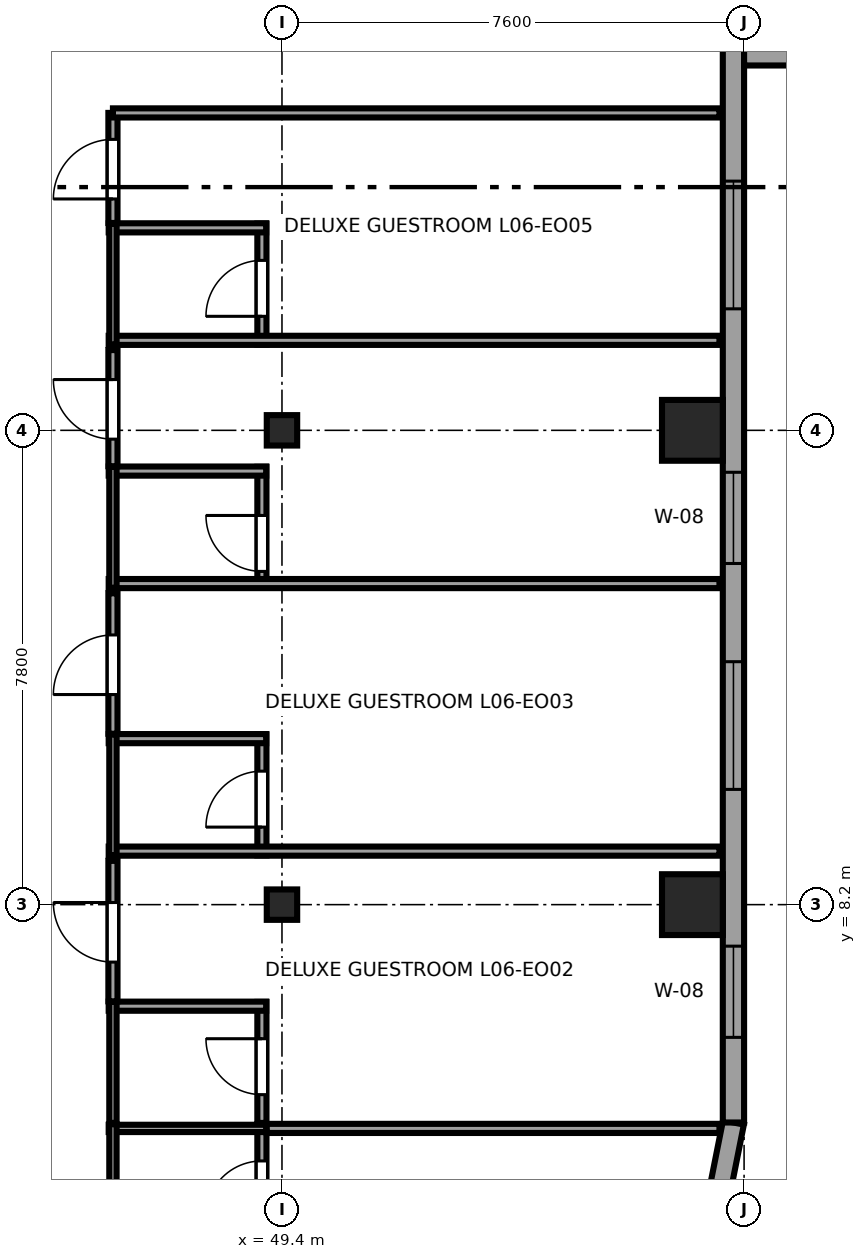
"""IFC4 building model, lengths in metres.
Left out: names, types, materials, properties, quantities, classifications, styles, units other than length and angle.
Written with IfcOpenShell. Run it as: python <this file> out.ifc"""

import sys

from ifc_helpers import new_model, si_unit, direction, frame, frame_2d, origin, origin_2d, place, context, subcontext, project, spatial, rectangle, i_section, extrude, source, transform, mapped, element, fill, save


model = new_model("IFC4")
c1 = context("Model", 3, precision=1e-05, world=origin(), true_north=direction((0.0, 1.0)))
c2 = subcontext(c1, "Body", "Model", "MODEL_VIEW")
j1 = project(units=[si_unit("LENGTHUNIT", "METRE"), si_unit("PLANEANGLEUNIT", "RADIAN")], contexts=[c1])
p1 = place(None, origin())
s1 = spatial("IfcSite", under=j1, at=p1, CompositionType="ELEMENT")
p2 = place(p1, origin())
s2 = spatial("IfcBuilding", under=s1, at=p2, CompositionType="ELEMENT")
p3 = place(p2, frame((0.0, 0.0, 32.0)))
s3 = spatial("IfcBuildingStorey", under=s2, at=p3, CompositionType="ELEMENT", Elevation=32.0)
m1 = source(origin(), c2, "Body", "SweptSolid", [
    extrude(i_section(OverallWidth=0.5, OverallDepth=0.5, WebThickness=0.028, FlangeThickness=0.045, at=origin_2d()), origin(), (0.0, 0.0, 1.0), 3.55),
])
for number, where, z_axis, x_axis in (
    (1, (49.4, 8.2, 0.0), (0.0, 0.0, 1.0), (1.0, 0.0, 0.0)),
    (2, (49.4, 16.0, 0.0), (0.0, 0.0, 1.0), (1.0, 0.0, 0.0)),
):
    element("IfcColumn", number, at=place(p3, frame(where, z_axis=z_axis, x_axis=x_axis)), inside=s3, PredefinedType="COLUMN", context=c2, shape_type="MappedRepresentation", body=[
        mapped(m1, transform((0.0, 0.0, 0.0), x_axis=(1.0, 0.0, 0.0), y_axis=(0.0, 1.0, 0.0), z_axis=(0.0, 0.0, 1.0), scale=1.0)),
    ])
m2 = source(origin(), c2, "Body", "SweptSolid", [
    extrude(rectangle(XDim=1.0, YDim=1.0, at=origin_2d()), origin(), (0.0, 0.0, 1.0), 3.55),
])
for number, where, z_axis, x_axis in (
    (3, (56.15, 8.2, 0.0), (0.0, 0.0, 1.0), (1.0, 0.0, 0.0)),
    (4, (56.15, 16.0, 0.0), (0.0, 0.0, 1.0), (1.0, 0.0, 0.0)),
):
    element("IfcColumn", number, at=place(p3, frame(where, z_axis=z_axis, x_axis=x_axis)), inside=s3, PredefinedType="COLUMN", context=c2, shape_type="MappedRepresentation", body=[
        mapped(m2, transform((0.0, 0.0, 0.0), x_axis=(1.0, 0.0, 0.0), y_axis=(0.0, 1.0, 0.0), z_axis=(0.0, 0.0, 1.0), scale=1.0)),
    ])
p4 = place(p3, frame((56.485, 2.908, 0.0), z_axis=(0.0, 0.0, 1.0), x_axis=(0.195011420161, 0.980800971659, 0.0)))
e5 = element("IfcWall", 5, at=p4, inside=s3, PredefinedType="SOLIDWALL", context=c2, shape_type="SweptSolid", body=[
    extrude(rectangle(XDim=1.743, YDim=0.35, at=frame_2d((0.871, 0.0))), origin(), (0.0, 0.0, 1.0), 3.37),
])
p5 = place(p3, frame((56.825, 4.617, 0.0), z_axis=(0.0, 0.0, 1.0), x_axis=(0.0, 1.0, 0.0)))
e6 = element("IfcWall", 6, at=p5, inside=s3, PredefinedType="SOLIDWALL", context=c2, shape_type="SweptSolid", body=[
    extrude(rectangle(XDim=36.766, YDim=0.35, at=frame_2d((18.383, 0.0))), origin(), (0.0, 0.0, 1.0), 3.37),
])
p6 = place(p5, frame((5.478, 0.0, 0.68)))
e7 = element("IfcOpeningElement", 7, at=p6, cuts=e6, PredefinedType="OPENING", context=c2, shape_type="SweptSolid", body=[
    extrude(rectangle(XDim=2.1, YDim=1.9, at=frame_2d((1.05, 0.95))), frame((0.0, 0.185, 0.0), z_axis=(0.0, -1.0, 0.0), x_axis=(1.0, 0.0, 0.0)), (0.0, 0.0, 1.0), 0.37),
])
p7 = place(p5, frame((13.381, 0.0, 0.68)))
e8 = element("IfcOpeningElement", 8, at=p7, cuts=e6, PredefinedType="OPENING", context=c2, shape_type="SweptSolid", body=[
    extrude(rectangle(XDim=2.1, YDim=1.9, at=frame_2d((1.05, 0.95))), frame((0.0, 0.185, 0.0), z_axis=(0.0, -1.0, 0.0), x_axis=(1.0, 0.0, 0.0)), (0.0, 0.0, 1.0), 0.37),
])
p8 = place(p5, frame((25.786, 0.0, 0.68)))
e9 = element("IfcOpeningElement", 9, at=p8, cuts=e6, PredefinedType="OPENING", context=c2, shape_type="SweptSolid", body=[
    extrude(rectangle(XDim=2.1, YDim=1.9, at=frame_2d((1.05, 0.95))), frame((0.0, 0.185, 0.0), z_axis=(0.0, -1.0, 0.0), x_axis=(1.0, 0.0, 0.0)), (0.0, 0.0, 1.0), 0.37),
])
p9 = place(p5, frame((30.238, 0.0, 0.68)))
e10 = element("IfcOpeningElement", 10, at=p9, cuts=e6, PredefinedType="OPENING", context=c2, shape_type="SweptSolid", body=[
    extrude(rectangle(XDim=2.1, YDim=1.9, at=frame_2d((1.05, 0.95))), frame((0.0, 0.185, 0.0), z_axis=(0.0, -1.0, 0.0), x_axis=(1.0, 0.0, 0.0)), (0.0, 0.0, 1.0), 0.37),
])
p10 = place(p5, frame((33.14, 0.0, 0.68)))
e11 = element("IfcOpeningElement", 11, at=p10, cuts=e6, PredefinedType="OPENING", context=c2, shape_type="SweptSolid", body=[
    extrude(rectangle(XDim=2.1, YDim=1.9, at=frame_2d((1.05, 0.95))), frame((0.0, 0.185, 0.0), z_axis=(0.0, -1.0, 0.0), x_axis=(1.0, 0.0, 0.0)), (0.0, 0.0, 1.0), 0.37),
])
p11 = place(p5, frame((1.4, 0.0, 0.62)))
e12 = element("IfcOpeningElement", 12, at=p11, cuts=e6, PredefinedType="OPENING", context=c2, shape_type="SweptSolid", body=[
    extrude(rectangle(XDim=1.5, YDim=1.55, at=frame_2d((0.75, 0.775))), frame((0.0, 0.185, 0.0), z_axis=(0.0, -1.0, 0.0), x_axis=(1.0, 0.0, 0.0)), (0.0, 0.0, 1.0), 0.37),
])
p12 = place(p5, frame((9.193, 0.0, 0.62)))
e13 = element("IfcOpeningElement", 13, at=p12, cuts=e6, PredefinedType="OPENING", context=c2, shape_type="SweptSolid", body=[
    extrude(rectangle(XDim=1.5, YDim=1.55, at=frame_2d((0.75, 0.775))), frame((0.0, 0.185, 0.0), z_axis=(0.0, -1.0, 0.0), x_axis=(1.0, 0.0, 0.0)), (0.0, 0.0, 1.0), 0.37),
])
p13 = place(p3, frame((57.0, 22.15, 0.0), z_axis=(0.0, 0.0, 1.0), x_axis=(1.0, 0.0, 0.0)))
e14 = element("IfcWall", 14, at=p13, inside=s3, PredefinedType="PARAPET", context=c2, shape_type="SweptSolid", body=[
    extrude(rectangle(XDim=8.25, YDim=0.3, at=frame_2d((4.125, 0.0))), origin(), (0.0, 0.0, 1.0), 1.15),
])
p14 = place(p3, frame((49.07, 2.6, 0.0), z_axis=(0.0, 0.0, 1.0), x_axis=(0.0, 1.0, 0.0)))
e15 = element("IfcWall", 15, at=p14, inside=s3, PredefinedType="PARTITIONING", context=c2, shape_type="SweptSolid", body=[
    extrude(rectangle(XDim=1.99, YDim=0.15, at=frame_2d((0.995, 0.0))), origin(), (0.0, 0.0, 1.0), 3.37),
])
p15 = place(p14, frame((0.465, 0.0, 0.0)))
e16 = element("IfcOpeningElement", 16, at=p15, cuts=e15, PredefinedType="OPENING", context=c2, shape_type="SweptSolid", body=[
    extrude(rectangle(XDim=0.92, YDim=2.01, at=frame_2d((0.46, 1.005))), frame((0.0, 0.085, 0.0), z_axis=(0.0, -1.0, 0.0), x_axis=(1.0, 0.0, 0.0)), (0.0, 0.0, 1.0), 0.17),
])
p16 = place(p3, frame((46.55, 4.52, 0.0), z_axis=(0.0, 0.0, 1.0), x_axis=(1.0, 0.0, 0.0)))
e17 = element("IfcWall", 17, at=p16, inside=s3, PredefinedType="PLUMBINGWALL", context=c2, shape_type="SweptSolid", body=[
    extrude(rectangle(XDim=2.59, YDim=0.12, at=frame_2d((1.295, 0.0))), origin(), (0.0, 0.0, 1.0), 3.37),
])
p17 = place(p3, frame((46.62, 2.6, 0.0), z_axis=(0.0, 0.0, 1.0), x_axis=(0.0, 1.0, 0.0)))
e18 = element("IfcWall", 18, at=p17, inside=s3, PredefinedType="PLUMBINGWALL", context=c2, shape_type="SweptSolid", body=[
    extrude(rectangle(XDim=1.99, YDim=0.12, at=frame_2d((0.995, 0.0))), origin(), (0.0, 0.0, 1.0), 3.37),
])
p18 = place(p3, frame((49.07, 4.61, 0.0), z_axis=(0.0, 0.0, 1.0), x_axis=(0.0, 1.0, 0.0)))
e19 = element("IfcWall", 19, at=p18, inside=s3, PredefinedType="PARTITIONING", context=c2, shape_type="SweptSolid", body=[
    extrude(rectangle(XDim=1.99, YDim=0.15, at=frame_2d((0.995, 0.0))), origin(), (0.0, 0.0, 1.0), 3.37),
])
p19 = place(p18, frame((0.465, 0.0, 0.0)))
e20 = element("IfcOpeningElement", 20, at=p19, cuts=e19, PredefinedType="OPENING", context=c2, shape_type="SweptSolid", body=[
    extrude(rectangle(XDim=0.92, YDim=2.01, at=frame_2d((0.46, 1.005))), frame((0.0, 0.085, 0.0), z_axis=(0.0, -1.0, 0.0), x_axis=(1.0, 0.0, 0.0)), (0.0, 0.0, 1.0), 0.17),
])
p20 = place(p3, frame((46.55, 6.53, 0.0), z_axis=(0.0, 0.0, 1.0), x_axis=(1.0, 0.0, 0.0)))
e21 = element("IfcWall", 21, at=p20, inside=s3, PredefinedType="PARTITIONING", context=c2, shape_type="SweptSolid", body=[
    extrude(rectangle(XDim=2.59, YDim=0.15, at=frame_2d((1.295, 0.0))), origin(), (0.0, 0.0, 1.0), 3.37),
])
p21 = place(p3, frame((46.62, 4.61, 0.0), z_axis=(0.0, 0.0, 1.0), x_axis=(0.0, 1.0, 0.0)))
e22 = element("IfcWall", 22, at=p21, inside=s3, PredefinedType="PLUMBINGWALL", context=c2, shape_type="SweptSolid", body=[
    extrude(rectangle(XDim=1.99, YDim=0.12, at=frame_2d((0.995, 0.0))), origin(), (0.0, 0.0, 1.0), 3.37),
])
p22 = place(p3, frame((49.07, 9.01, 0.0), z_axis=(0.0, 0.0, 1.0), x_axis=(0.0, 1.0, 0.0)))
e23 = element("IfcWall", 23, at=p22, inside=s3, PredefinedType="PARTITIONING", context=c2, shape_type="SweptSolid", body=[
    extrude(rectangle(XDim=1.99, YDim=0.15, at=frame_2d((0.995, 0.0))), origin(), (0.0, 0.0, 1.0), 3.37),
])
p23 = place(p22, frame((0.465, 0.0, 0.0)))
e24 = element("IfcOpeningElement", 24, at=p23, cuts=e23, PredefinedType="OPENING", context=c2, shape_type="SweptSolid", body=[
    extrude(rectangle(XDim=0.92, YDim=2.01, at=frame_2d((0.46, 1.005))), frame((0.0, 0.085, 0.0), z_axis=(0.0, -1.0, 0.0), x_axis=(1.0, 0.0, 0.0)), (0.0, 0.0, 1.0), 0.17),
])
p24 = place(p3, frame((46.55, 9.08, 0.0), z_axis=(0.0, 0.0, 1.0), x_axis=(1.0, 0.0, 0.0)))
e25 = element("IfcWall", 25, at=p24, inside=s3, PredefinedType="PARTITIONING", context=c2, shape_type="SweptSolid", body=[
    extrude(rectangle(XDim=10.045, YDim=0.15, at=frame_2d((5.022, 0.0))), origin(), (0.0, 0.0, 1.0), 3.37),
])
p25 = place(p3, frame((46.55, 10.93, 0.0), z_axis=(0.0, 0.0, 1.0), x_axis=(1.0, 0.0, 0.0)))
e26 = element("IfcWall", 26, at=p25, inside=s3, PredefinedType="PARTITIONING", context=c2, shape_type="SweptSolid", body=[
    extrude(rectangle(XDim=2.59, YDim=0.15, at=frame_2d((1.295, 0.0))), origin(), (0.0, 0.0, 1.0), 3.37),
])
p26 = place(p3, frame((46.62, 9.01, 0.0), z_axis=(0.0, 0.0, 1.0), x_axis=(0.0, 1.0, 0.0)))
e27 = element("IfcWall", 27, at=p26, inside=s3, PredefinedType="PLUMBINGWALL", context=c2, shape_type="SweptSolid", body=[
    extrude(rectangle(XDim=1.99, YDim=0.12, at=frame_2d((0.995, 0.0))), origin(), (0.0, 0.0, 1.0), 3.37),
])
p27 = place(p3, frame((49.07, 13.41, 0.0), z_axis=(0.0, 0.0, 1.0), x_axis=(0.0, 1.0, 0.0)))
e28 = element("IfcWall", 28, at=p27, inside=s3, PredefinedType="PARTITIONING", context=c2, shape_type="SweptSolid", body=[
    extrude(rectangle(XDim=1.99, YDim=0.15, at=frame_2d((0.995, 0.0))), origin(), (0.0, 0.0, 1.0), 3.37),
])
p28 = place(p27, frame((0.27, 0.0, 0.0)))
e29 = element("IfcOpeningElement", 29, at=p28, cuts=e28, PredefinedType="OPENING", context=c2, shape_type="SweptSolid", body=[
    extrude(rectangle(XDim=0.92, YDim=2.01, at=frame_2d((0.46, 1.005))), frame((0.0, 0.085, 0.0), z_axis=(0.0, -1.0, 0.0), x_axis=(1.0, 0.0, 0.0)), (0.0, 0.0, 1.0), 0.17),
])
p29 = place(p3, frame((46.55, 13.48, 0.0), z_axis=(0.0, 0.0, 1.0), x_axis=(1.0, 0.0, 0.0)))
e30 = element("IfcWall", 30, at=p29, inside=s3, PredefinedType="PARTITIONING", context=c2, shape_type="SweptSolid", body=[
    extrude(rectangle(XDim=10.045, YDim=0.15, at=frame_2d((5.022, 0.0))), origin(), (0.0, 0.0, 1.0), 3.37),
])
p30 = place(p3, frame((46.55, 15.33, 0.0), z_axis=(0.0, 0.0, 1.0), x_axis=(1.0, 0.0, 0.0)))
e31 = element("IfcWall", 31, at=p30, inside=s3, PredefinedType="PARTITIONING", context=c2, shape_type="SweptSolid", body=[
    extrude(rectangle(XDim=2.59, YDim=0.15, at=frame_2d((1.295, 0.0))), origin(), (0.0, 0.0, 1.0), 3.37),
])
p31 = place(p3, frame((46.62, 13.41, 0.0), z_axis=(0.0, 0.0, 1.0), x_axis=(0.0, 1.0, 0.0)))
e32 = element("IfcWall", 32, at=p31, inside=s3, PredefinedType="PLUMBINGWALL", context=c2, shape_type="SweptSolid", body=[
    extrude(rectangle(XDim=1.99, YDim=0.12, at=frame_2d((0.995, 0.0))), origin(), (0.0, 0.0, 1.0), 3.37),
])
p32 = place(p3, frame((49.07, 17.41, 0.0), z_axis=(0.0, 0.0, 1.0), x_axis=(0.0, 1.0, 0.0)))
e33 = element("IfcWall", 33, at=p32, inside=s3, PredefinedType="PARTITIONING", context=c2, shape_type="SweptSolid", body=[
    extrude(rectangle(XDim=1.99, YDim=0.15, at=frame_2d((0.995, 0.0))), origin(), (0.0, 0.0, 1.0), 3.37),
])
p33 = place(p32, frame((0.465, 0.0, 0.0)))
e34 = element("IfcOpeningElement", 34, at=p33, cuts=e33, PredefinedType="OPENING", context=c2, shape_type="SweptSolid", body=[
    extrude(rectangle(XDim=0.92, YDim=2.01, at=frame_2d((0.46, 1.005))), frame((0.0, 0.085, 0.0), z_axis=(0.0, -1.0, 0.0), x_axis=(1.0, 0.0, 0.0)), (0.0, 0.0, 1.0), 0.17),
])
p34 = place(p3, frame((46.55, 17.48, 0.0), z_axis=(0.0, 0.0, 1.0), x_axis=(1.0, 0.0, 0.0)))
e35 = element("IfcWall", 35, at=p34, inside=s3, PredefinedType="PARTITIONING", context=c2, shape_type="SweptSolid", body=[
    extrude(rectangle(XDim=10.045, YDim=0.15, at=frame_2d((5.022, 0.0))), origin(), (0.0, 0.0, 1.0), 3.37),
])
p35 = place(p3, frame((46.55, 19.33, 0.0), z_axis=(0.0, 0.0, 1.0), x_axis=(1.0, 0.0, 0.0)))
e36 = element("IfcWall", 36, at=p35, inside=s3, PredefinedType="PARTITIONING", context=c2, shape_type="SweptSolid", body=[
    extrude(rectangle(XDim=2.59, YDim=0.15, at=frame_2d((1.295, 0.0))), origin(), (0.0, 0.0, 1.0), 3.37),
])
p36 = place(p3, frame((46.62, 17.41, 0.0), z_axis=(0.0, 0.0, 1.0), x_axis=(0.0, 1.0, 0.0)))
e37 = element("IfcWall", 37, at=p36, inside=s3, PredefinedType="PLUMBINGWALL", context=c2, shape_type="SweptSolid", body=[
    extrude(rectangle(XDim=1.99, YDim=0.12, at=frame_2d((0.995, 0.0))), origin(), (0.0, 0.0, 1.0), 3.37),
])
p37 = place(p3, frame((49.15, 4.52, 0.0), z_axis=(0.0, 0.0, 1.0), x_axis=(1.0, 0.0, 0.0)))
e38 = element("IfcWall", 38, at=p37, inside=s3, PredefinedType="PARTITIONING", context=c2, shape_type="SweptSolid", body=[
    extrude(rectangle(XDim=7.445, YDim=0.15, at=frame_2d((3.723, 0.0))), origin(), (0.0, 0.0, 1.0), 3.37),
])
p38 = place(p3, frame((46.62, 6.61, 0.0), z_axis=(0.0, 0.0, 1.0), x_axis=(0.0, 1.0, 0.0)))
e39 = element("IfcWall", 39, at=p38, inside=s3, PredefinedType="PARTITIONING", context=c2, shape_type="SweptSolid", body=[
    extrude(rectangle(XDim=2.31, YDim=0.15, at=frame_2d((1.155, 0.0))), origin(), (0.0, 0.0, 1.0), 3.37),
])
p39 = place(p38, frame((0.645, 0.0, 0.0)))
e40 = element("IfcOpeningElement", 40, at=p39, cuts=e39, PredefinedType="OPENING", context=c2, shape_type="SweptSolid", body=[
    extrude(rectangle(XDim=0.98, YDim=2.12, at=frame_2d((0.49, 1.06))), frame((0.0, 0.085, 0.0), z_axis=(0.0, -1.0, 0.0), x_axis=(1.0, 0.0, 0.0)), (0.0, 0.0, 1.0), 0.17),
])
p40 = place(p3, frame((46.62, 11.01, 0.0), z_axis=(0.0, 0.0, 1.0), x_axis=(0.0, 1.0, 0.0)))
e41 = element("IfcWall", 41, at=p40, inside=s3, PredefinedType="PARTITIONING", context=c2, shape_type="SweptSolid", body=[
    extrude(rectangle(XDim=2.31, YDim=0.15, at=frame_2d((1.155, 0.0))), origin(), (0.0, 0.0, 1.0), 3.37),
])
p41 = place(p40, frame((0.645, 0.0, 0.0)))
e42 = element("IfcOpeningElement", 42, at=p41, cuts=e41, PredefinedType="OPENING", context=c2, shape_type="SweptSolid", body=[
    extrude(rectangle(XDim=0.98, YDim=2.12, at=frame_2d((0.49, 1.06))), frame((0.0, 0.085, 0.0), z_axis=(0.0, -1.0, 0.0), x_axis=(1.0, 0.0, 0.0)), (0.0, 0.0, 1.0), 0.17),
])
p42 = place(p3, frame((46.62, 15.41, 0.0), z_axis=(0.0, 0.0, 1.0), x_axis=(0.0, 1.0, 0.0)))
e43 = element("IfcWall", 43, at=p42, inside=s3, PredefinedType="PARTITIONING", context=c2, shape_type="SweptSolid", body=[
    extrude(rectangle(XDim=1.91, YDim=0.15, at=frame_2d((0.955, 0.0))), origin(), (0.0, 0.0, 1.0), 3.37),
])
p43 = place(p42, frame((0.445, 0.0, 0.0)))
e44 = element("IfcOpeningElement", 44, at=p43, cuts=e43, PredefinedType="OPENING", context=c2, shape_type="SweptSolid", body=[
    extrude(rectangle(XDim=0.98, YDim=2.12, at=frame_2d((0.49, 1.06))), frame((0.0, 0.085, 0.0), z_axis=(0.0, -1.0, 0.0), x_axis=(1.0, 0.0, 0.0)), (0.0, 0.0, 1.0), 0.17),
])
p44 = place(p3, frame((46.62, 19.41, 0.0), z_axis=(0.0, 0.0, 1.0), x_axis=(0.0, 1.0, 0.0)))
e45 = element("IfcWall", 45, at=p44, inside=s3, PredefinedType="PARTITIONING", context=c2, shape_type="SweptSolid", body=[
    extrude(rectangle(XDim=1.81, YDim=0.15, at=frame_2d((0.905, 0.0))), origin(), (0.0, 0.0, 1.0), 3.37),
])
p45 = place(p44, frame((0.395, 0.0, 0.0)))
e46 = element("IfcOpeningElement", 46, at=p45, cuts=e45, PredefinedType="OPENING", context=c2, shape_type="SweptSolid", body=[
    extrude(rectangle(XDim=0.98, YDim=2.12, at=frame_2d((0.49, 1.06))), frame((0.0, 0.085, 0.0), z_axis=(0.0, -1.0, 0.0), x_axis=(1.0, 0.0, 0.0)), (0.0, 0.0, 1.0), 0.17),
])
p46 = place(p3, frame((46.62, 21.22, 0.0), z_axis=(0.0, 0.0, 1.0), x_axis=(1.0, 0.0, 0.0)))
e47 = element("IfcWall", 47, at=p46, inside=s3, PredefinedType="PARTITIONING", context=c2, shape_type="SweptSolid", body=[
    extrude(rectangle(XDim=9.975, YDim=0.15, at=frame_2d((4.987, 0.0))), origin(), (0.0, 0.0, 1.0), 3.37),
])
m3 = source(origin(), c2, "Body", "SweptSolid", [
    extrude(rectangle(XDim=2.1, YDim=1.9, at=frame_2d((1.05, 0.95))), frame((0.0, 0.09, 0.0), z_axis=(0.0, -1.0, 0.0), x_axis=(1.0, 0.0, 0.0)), (0.0, 0.0, 1.0), 0.06),
])
p47 = place(p6, origin())
e48 = element("IfcWindow", 48, at=p47, inside=s3, PartitioningType="TRIPLE_PANEL_HORIZONTAL", PredefinedType="WINDOW", context=c2, shape_type="MappedRepresentation", body=[
    mapped(m3, transform((0.0, 0.0, 0.0), x_axis=(1.0, 0.0, 0.0), y_axis=(0.0, 1.0, 0.0), z_axis=(0.0, 0.0, 1.0), scale=1.0)),
])
fill(e7, e48)
p48 = place(p7, origin())
e49 = element("IfcWindow", 49, at=p48, inside=s3, PartitioningType="TRIPLE_PANEL_HORIZONTAL", PredefinedType="WINDOW", context=c2, shape_type="MappedRepresentation", body=[
    mapped(m3, transform((0.0, 0.0, 0.0), x_axis=(1.0, 0.0, 0.0), y_axis=(0.0, 1.0, 0.0), z_axis=(0.0, 0.0, 1.0), scale=1.0)),
])
fill(e8, e49)
m4 = source(origin(), c2, "Body", "SweptSolid", [
    extrude(rectangle(XDim=1.5, YDim=1.55, at=frame_2d((0.75, 0.775))), frame((0.0, 0.09, 0.0), z_axis=(0.0, -1.0, 0.0), x_axis=(1.0, 0.0, 0.0)), (0.0, 0.0, 1.0), 0.06),
])
p49 = place(p11, origin())
e50 = element("IfcWindow", 50, at=p49, inside=s3, PartitioningType="SINGLE_PANEL", PredefinedType="WINDOW", context=c2, shape_type="MappedRepresentation", body=[
    mapped(m4, transform((0.0, 0.0, 0.0), x_axis=(1.0, 0.0, 0.0), y_axis=(0.0, 1.0, 0.0), z_axis=(0.0, 0.0, 1.0), scale=1.0)),
])
fill(e12, e50)
p50 = place(p12, origin())
e51 = element("IfcWindow", 51, at=p50, inside=s3, PartitioningType="SINGLE_PANEL", PredefinedType="WINDOW", context=c2, shape_type="MappedRepresentation", body=[
    mapped(m4, transform((0.0, 0.0, 0.0), x_axis=(1.0, 0.0, 0.0), y_axis=(0.0, 1.0, 0.0), z_axis=(0.0, 0.0, 1.0), scale=1.0)),
])
fill(e13, e51)
m5 = source(origin(), c2, "Body", "SweptSolid", [
    extrude(rectangle(XDim=0.92, YDim=2.01, at=frame_2d((0.46, 1.005))), frame((0.0, 0.025, 0.0), z_axis=(0.0, -1.0, 0.0), x_axis=(1.0, 0.0, 0.0)), (0.0, 0.0, 1.0), 0.05),
])
p51 = place(p15, origin())
e52 = element("IfcDoor", 52, at=p51, inside=s3, OperationType="SINGLE_SWING_LEFT", PredefinedType="DOOR", context=c2, shape_type="MappedRepresentation", body=[
    mapped(m5, transform((0.0, 0.0, 0.0), x_axis=(1.0, 0.0, 0.0), y_axis=(0.0, 1.0, 0.0), z_axis=(0.0, 0.0, 1.0), scale=1.0)),
])
fill(e16, e52)
p52 = place(p19, origin())
e53 = element("IfcDoor", 53, at=p52, inside=s3, OperationType="SINGLE_SWING_RIGHT", PredefinedType="DOOR", context=c2, shape_type="MappedRepresentation", body=[
    mapped(m5, transform((0.0, 0.0, 0.0), x_axis=(1.0, 0.0, 0.0), y_axis=(0.0, 1.0, 0.0), z_axis=(0.0, 0.0, 1.0), scale=1.0)),
])
fill(e20, e53)
p53 = place(p23, origin())
e54 = element("IfcDoor", 54, at=p53, inside=s3, OperationType="SINGLE_SWING_LEFT", PredefinedType="DOOR", context=c2, shape_type="MappedRepresentation", body=[
    mapped(m5, transform((0.0, 0.0, 0.0), x_axis=(1.0, 0.0, 0.0), y_axis=(0.0, 1.0, 0.0), z_axis=(0.0, 0.0, 1.0), scale=1.0)),
])
fill(e24, e54)
p54 = place(p28, origin())
e55 = element("IfcDoor", 55, at=p54, inside=s3, OperationType="SINGLE_SWING_RIGHT", PredefinedType="DOOR", context=c2, shape_type="MappedRepresentation", body=[
    mapped(m5, transform((0.0, 0.0, 0.0), x_axis=(1.0, 0.0, 0.0), y_axis=(0.0, 1.0, 0.0), z_axis=(0.0, 0.0, 1.0), scale=1.0)),
])
fill(e29, e55)
p55 = place(p33, origin())
e56 = element("IfcDoor", 56, at=p55, inside=s3, OperationType="SINGLE_SWING_LEFT", PredefinedType="DOOR", context=c2, shape_type="MappedRepresentation", body=[
    mapped(m5, transform((0.0, 0.0, 0.0), x_axis=(1.0, 0.0, 0.0), y_axis=(0.0, 1.0, 0.0), z_axis=(0.0, 0.0, 1.0), scale=1.0)),
])
fill(e34, e56)
m6 = source(origin(), c2, "Body", "SweptSolid", [
    extrude(rectangle(XDim=0.98, YDim=2.12, at=frame_2d((0.49, 1.06))), frame((0.0, 0.025, 0.0), z_axis=(0.0, -1.0, 0.0), x_axis=(1.0, 0.0, 0.0)), (0.0, 0.0, 1.0), 0.05),
])
p56 = place(p39, origin())
e57 = element("IfcDoor", 57, at=p56, inside=s3, OperationType="SINGLE_SWING_RIGHT", PredefinedType="DOOR", context=c2, shape_type="MappedRepresentation", body=[
    mapped(m6, transform((0.0, 0.0, 0.0), x_axis=(1.0, 0.0, 0.0), y_axis=(0.0, 1.0, 0.0), z_axis=(0.0, 0.0, 1.0), scale=1.0)),
])
fill(e40, e57)
p57 = place(p41, origin())
e58 = element("IfcDoor", 58, at=p57, inside=s3, OperationType="SINGLE_SWING_LEFT", PredefinedType="DOOR", context=c2, shape_type="MappedRepresentation", body=[
    mapped(m6, transform((0.0, 0.0, 0.0), x_axis=(1.0, 0.0, 0.0), y_axis=(0.0, 1.0, 0.0), z_axis=(0.0, 0.0, 1.0), scale=1.0)),
])
fill(e42, e58)
p58 = place(p43, origin())
e59 = element("IfcDoor", 59, at=p58, inside=s3, OperationType="SINGLE_SWING_RIGHT", PredefinedType="DOOR", context=c2, shape_type="MappedRepresentation", body=[
    mapped(m6, transform((0.0, 0.0, 0.0), x_axis=(1.0, 0.0, 0.0), y_axis=(0.0, 1.0, 0.0), z_axis=(0.0, 0.0, 1.0), scale=1.0)),
])
fill(e44, e59)
p59 = place(p45, origin())
e60 = element("IfcDoor", 60, at=p59, inside=s3, OperationType="SINGLE_SWING_LEFT", PredefinedType="DOOR", context=c2, shape_type="MappedRepresentation", body=[
    mapped(m6, transform((0.0, 0.0, 0.0), x_axis=(1.0, 0.0, 0.0), y_axis=(0.0, 1.0, 0.0), z_axis=(0.0, 0.0, 1.0), scale=1.0)),
])
fill(e46, e60)
save(model, sys.argv[1])
